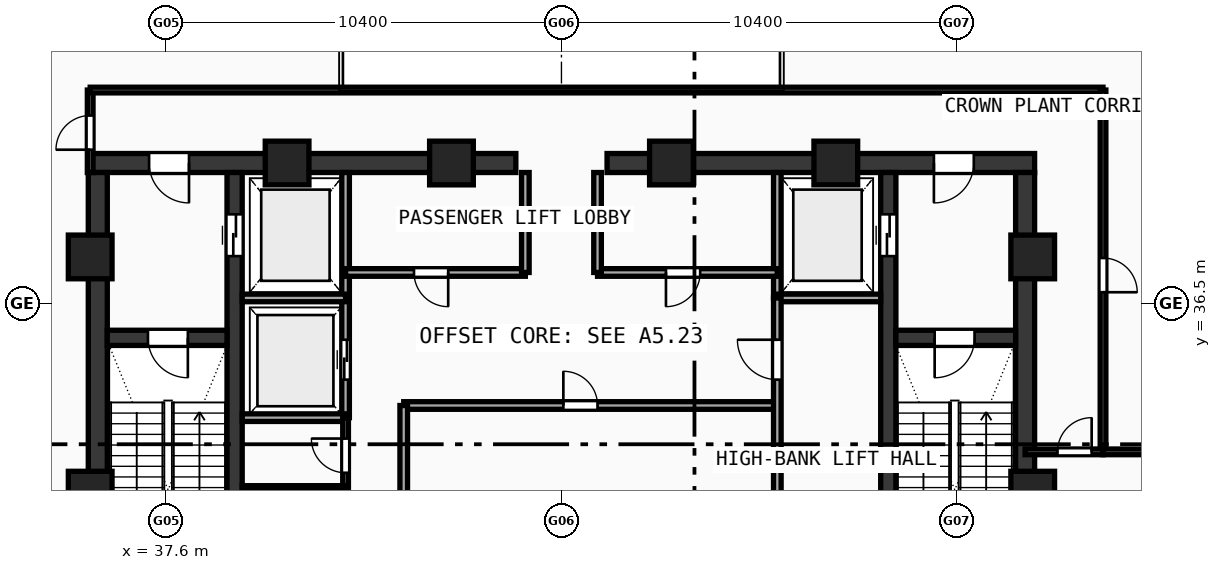
"""IFC4 building model, lengths in metres.
Left out: names, types, materials, properties, quantities, classifications, styles, units other than length and angle.
Written with IfcOpenShell. Run it as: python <this file> out.ifc"""

import sys

from ifc_helpers import new_model, si_unit, direction, frame, frame_2d, origin, origin_with_axes, origin_2d, place, context, subcontext, project, spatial, rectangle, hollow_rectangle, extrude, source, transform, mapped, element, fill, save


model = new_model("IFC4")
c1 = context("Model", 3, precision=1e-05, world=origin(), true_north=direction((0.0, 1.0)))
c2 = subcontext(c1, "Body", "Model", "MODEL_VIEW")
j1 = project(units=[si_unit("LENGTHUNIT", "METRE"), si_unit("PLANEANGLEUNIT", "RADIAN")], contexts=[c1])
p1 = place(None, origin())
s1 = spatial("IfcSite", under=j1, at=p1, CompositionType="ELEMENT")
p2 = place(p1, origin())
s2 = spatial("IfcBuilding", under=s1, at=p2, CompositionType="ELEMENT")
p3 = place(p2, frame((0.0, 0.0, 376.76)))
s3 = spatial("IfcBuildingStorey", under=s2, at=p3, CompositionType="ELEMENT", Elevation=376.76)
p4 = place(p3, frame((35.55, 40.2, 0.0), z_axis=(0.0, 0.0, 1.0), x_axis=(1.0, 0.0, 0.0)))
e1 = element("IfcWall", 1, at=p4, inside=s3, PredefinedType="SHEAR", context=c2, shape_type="SweptSolid", body=[
    extrude(rectangle(XDim=11.25, YDim=0.5, at=frame_2d((5.625, 0.0))), origin(), (0.0, 0.0, 1.0), 4.72),
])
p5 = place(p4, frame((1.6, 0.0, 0.0)))
e2 = element("IfcOpeningElement", 2, at=p5, cuts=e1, PredefinedType="OPENING", context=c2, shape_type="SweptSolid", body=[
    extrude(rectangle(XDim=1.05, YDim=2.1, at=frame_2d((0.525, 1.05))), frame((0.0, 0.26, 0.0), z_axis=(0.0, -1.0, 0.0), x_axis=(1.0, 0.0, 0.0)), (0.0, 0.0, 1.0), 0.52),
])
p6 = place(p3, frame((49.2, 40.2, 0.0), z_axis=(0.0, 0.0, 1.0), x_axis=(1.0, 0.0, 0.0)))
e3 = element("IfcWall", 3, at=p6, inside=s3, PredefinedType="SHEAR", context=c2, shape_type="SweptSolid", body=[
    extrude(rectangle(XDim=11.25, YDim=0.5, at=frame_2d((5.625, 0.0))), origin(), (0.0, 0.0, 1.0), 4.72),
])
p7 = place(p6, frame((8.6, 0.0, 0.0)))
e4 = element("IfcOpeningElement", 4, at=p7, cuts=e3, PredefinedType="OPENING", context=c2, shape_type="SweptSolid", body=[
    extrude(rectangle(XDim=1.05, YDim=2.1, at=frame_2d((0.525, 1.05))), frame((0.0, 0.26, 0.0), z_axis=(0.0, -1.0, 0.0), x_axis=(1.0, 0.0, 0.0)), (0.0, 0.0, 1.0), 0.52),
])
for number, where, z_axis, x_axis in (
    (5, (35.8, 27.75, 0.0), (0.0, 0.0, 1.0), (0.0, 1.0, 0.0)),
    (6, (60.2, 27.75, 0.0), (0.0, 0.0, 1.0), (0.0, 1.0, 0.0)),
):
    element("IfcWall", number, at=place(p3, frame(where, z_axis=z_axis, x_axis=x_axis)), inside=s3, PredefinedType="SHEAR", context=c2, shape_type="SweptSolid", body=[
        extrude(rectangle(XDim=12.2, YDim=0.5, at=frame_2d((6.1, 0.0))), origin(), (0.0, 0.0, 1.0), 4.72),
    ])
p8 = place(p3, frame((39.4, 27.75, 0.0), z_axis=(0.0, 0.0, 1.0), x_axis=(0.0, 1.0, 0.0)))
e7 = element("IfcWall", 7, at=p8, inside=s3, PredefinedType="SHEAR", context=c2, shape_type="SweptSolid", body=[
    extrude(rectangle(XDim=12.2, YDim=0.4, at=frame_2d((6.1, 0.0))), origin(), (0.0, 0.0, 1.0), 4.72),
])
p9 = place(p8, frame((10.0, 0.0, 0.0)))
e8 = element("IfcOpeningElement", 8, at=p9, cuts=e7, PredefinedType="OPENING", context=c2, shape_type="SweptSolid", body=[
    extrude(rectangle(XDim=1.1, YDim=2.1, at=frame_2d((0.55, 1.05))), frame((0.0, 0.21, 0.0), z_axis=(0.0, -1.0, 0.0), x_axis=(1.0, 0.0, 0.0)), (0.0, 0.0, 1.0), 0.42),
])
p10 = place(p3, frame((56.6, 27.75, 0.0), z_axis=(0.0, 0.0, 1.0), x_axis=(0.0, 1.0, 0.0)))
e9 = element("IfcWall", 9, at=p10, inside=s3, PredefinedType="SHEAR", context=c2, shape_type="SweptSolid", body=[
    extrude(rectangle(XDim=12.2, YDim=0.4, at=frame_2d((6.1, 0.0))), origin(), (0.0, 0.0, 1.0), 4.72),
])
p11 = place(p10, frame((10.0, 0.0, 0.0)))
e10 = element("IfcOpeningElement", 10, at=p11, cuts=e9, PredefinedType="OPENING", context=c2, shape_type="SweptSolid", body=[
    extrude(rectangle(XDim=1.1, YDim=2.1, at=frame_2d((0.55, 1.05))), frame((0.0, 0.21, 0.0), z_axis=(0.0, -1.0, 0.0), x_axis=(1.0, 0.0, 0.0)), (0.0, 0.0, 1.0), 0.42),
])
p12 = place(p3, frame((36.05, 35.6, 0.0), z_axis=(0.0, 0.0, 1.0), x_axis=(1.0, 0.0, 0.0)))
e11 = element("IfcWall", 11, at=p12, inside=s3, PredefinedType="SHEAR", context=c2, shape_type="SweptSolid", body=[
    extrude(rectangle(XDim=3.15, YDim=0.4, at=frame_2d((1.575, 0.0))), origin(), (0.0, 0.0, 1.0), 4.72),
])
p13 = place(p12, frame((1.07, 0.0, 0.0)))
e12 = element("IfcOpeningElement", 12, at=p13, cuts=e11, PredefinedType="OPENING", context=c2, shape_type="SweptSolid", body=[
    extrude(rectangle(XDim=1.05, YDim=2.1, at=frame_2d((0.525, 1.05))), frame((0.0, 0.21, 0.0), z_axis=(0.0, -1.0, 0.0), x_axis=(1.0, 0.0, 0.0)), (0.0, 0.0, 1.0), 0.42),
])
p14 = place(p3, frame((56.8, 35.6, 0.0), z_axis=(0.0, 0.0, 1.0), x_axis=(1.0, 0.0, 0.0)))
e13 = element("IfcWall", 13, at=p14, inside=s3, PredefinedType="SHEAR", context=c2, shape_type="SweptSolid", body=[
    extrude(rectangle(XDim=3.15, YDim=0.4, at=frame_2d((1.575, 0.0))), origin(), (0.0, 0.0, 1.0), 4.72),
])
p15 = place(p14, frame((1.02, 0.0, 0.0)))
e14 = element("IfcOpeningElement", 14, at=p15, cuts=e13, PredefinedType="OPENING", context=c2, shape_type="SweptSolid", body=[
    extrude(rectangle(XDim=1.05, YDim=2.1, at=frame_2d((0.525, 1.05))), frame((0.0, 0.21, 0.0), z_axis=(0.0, -1.0, 0.0), x_axis=(1.0, 0.0, 0.0)), (0.0, 0.0, 1.0), 0.42),
])
m1 = source(origin(), c2, "Body", "SweptSolid", [
    extrude(hollow_rectangle(XDim=1.15, YDim=1.15, WallThickness=0.048, at=origin_2d()), origin(), (0.0, 0.0, 1.0), 5.0),
])
for number, where, z_axis, x_axis in (
    (15, (60.4, 31.513, -0.28), (0.0, 0.0, 1.0), (1.0, 0.0, 0.0)),
    (16, (60.4, 37.729, -0.28), (0.0, 0.0, 1.0), (1.0, 0.0, 0.0)),
    (17, (55.219, 40.2, -0.28), (0.0, 0.0, 1.0), (1.0, 0.0, 0.0)),
    (18, (50.894, 40.2, -0.28), (0.0, 0.0, 1.0), (1.0, 0.0, 0.0)),
    (19, (45.106, 40.2, -0.28), (0.0, 0.0, 1.0), (1.0, 0.0, 0.0)),
    (20, (40.781, 40.2, -0.28), (0.0, 0.0, 1.0), (1.0, 0.0, 0.0)),
    (21, (35.6, 37.729, -0.28), (0.0, 0.0, 1.0), (1.0, 0.0, 0.0)),
    (22, (35.6, 31.513, -0.28), (0.0, 0.0, 1.0), (1.0, 0.0, 0.0)),
):
    element("IfcColumn", number, at=place(p3, frame(where, z_axis=z_axis, x_axis=x_axis)), inside=s3, PredefinedType="COLUMN", context=c2, shape_type="MappedRepresentation", body=[
        mapped(m1, transform((0.0, 0.0, 0.0), scale=1.0)),
    ])
p16 = place(p3, frame((42.32, 33.5, 0.0), z_axis=(0.0, 0.0, 1.0), x_axis=(0.0, 1.0, 0.0)))
e23 = element("IfcWall", 23, at=p16, inside=s3, PredefinedType="SOLIDWALL", context=c2, shape_type="SweptSolid", body=[
    extrude(rectangle(XDim=6.45, YDim=0.2, at=frame_2d((3.225, 0.0))), origin(), (0.0, 0.0, 1.0), 4.72),
])
p17 = place(p16, frame((1.0, 0.0, 0.0)))
e24 = element("IfcOpeningElement", 24, at=p17, cuts=e23, PredefinedType="OPENING", context=c2, shape_type="SweptSolid", body=[
    extrude(rectangle(XDim=1.05, YDim=2.1, at=frame_2d((0.525, 1.05))), frame((0.0, 0.11, 0.0), z_axis=(0.0, -1.0, 0.0), x_axis=(1.0, 0.0, 0.0)), (0.0, 0.0, 1.0), 0.22),
])
for number, where, z_axis, x_axis in (
    (25, (39.6, 36.65, 0.0), (0.0, 0.0, 1.0), (1.0, 0.0, 0.0)),
    (26, (39.6, 33.5, 0.0), (0.0, 0.0, 1.0), (1.0, 0.0, 0.0)),
):
    element("IfcWall", number, at=place(p3, frame(where, z_axis=z_axis, x_axis=x_axis)), inside=s3, PredefinedType="SOLIDWALL", context=c2, shape_type="SweptSolid", body=[
        extrude(rectangle(XDim=2.72, YDim=0.2, at=frame_2d((1.36, 0.0))), origin(), (0.0, 0.0, 1.0), 4.72),
    ])
p18 = place(p3, frame((53.68, 36.65, 0.0), z_axis=(0.0, 0.0, 1.0), x_axis=(0.0, 1.0, 0.0)))
e27 = element("IfcWall", 27, at=p18, inside=s3, PredefinedType="SOLIDWALL", context=c2, shape_type="SweptSolid", body=[
    extrude(rectangle(XDim=3.3, YDim=0.2, at=frame_2d((1.65, 0.0))), origin(), (0.0, 0.0, 1.0), 4.72),
])
p19 = place(p3, frame((53.68, 36.65, 0.0), z_axis=(0.0, 0.0, 1.0), x_axis=(1.0, 0.0, 0.0)))
e28 = element("IfcWall", 28, at=p19, inside=s3, PredefinedType="SOLIDWALL", context=c2, shape_type="SweptSolid", body=[
    extrude(rectangle(XDim=2.72, YDim=0.2, at=frame_2d((1.36, 0.0))), origin(), (0.0, 0.0, 1.0), 4.72),
])
p20 = place(p3, frame((42.32, 37.32, 0.0), z_axis=(0.0, 0.0, 1.0), x_axis=(1.0, 0.0, 0.0)))
e29 = element("IfcWall", 29, at=p20, inside=s3, PredefinedType="SOLIDWALL", context=c2, shape_type="SweptSolid", body=[
    extrude(rectangle(XDim=4.73, YDim=0.2, at=frame_2d((2.365, 0.0))), origin(), (0.0, 0.0, 1.0), 4.72),
])
p21 = place(p20, frame((1.8, 0.0, 0.0)))
e30 = element("IfcOpeningElement", 30, at=p21, cuts=e29, PredefinedType="OPENING", context=c2, shape_type="SweptSolid", body=[
    extrude(rectangle(XDim=0.9, YDim=2.1, at=frame_2d((0.45, 1.05))), frame((0.0, 0.11, 0.0), z_axis=(0.0, -1.0, 0.0), x_axis=(1.0, 0.0, 0.0)), (0.0, 0.0, 1.0), 0.22),
])
p22 = place(p3, frame((48.95, 37.32, 0.0), z_axis=(0.0, 0.0, 1.0), x_axis=(1.0, 0.0, 0.0)))
e31 = element("IfcWall", 31, at=p22, inside=s3, PredefinedType="SOLIDWALL", context=c2, shape_type="SweptSolid", body=[
    extrude(rectangle(XDim=4.73, YDim=0.2, at=frame_2d((2.365, 0.0))), origin(), (0.0, 0.0, 1.0), 4.72),
])
p23 = place(p22, frame((1.8, 0.0, 0.0)))
e32 = element("IfcOpeningElement", 32, at=p23, cuts=e31, PredefinedType="OPENING", context=c2, shape_type="SweptSolid", body=[
    extrude(rectangle(XDim=0.9, YDim=2.1, at=frame_2d((0.45, 1.05))), frame((0.0, 0.11, 0.0), z_axis=(0.0, -1.0, 0.0), x_axis=(1.0, 0.0, 0.0)), (0.0, 0.0, 1.0), 0.22),
])
for number, where, z_axis, x_axis in (
    (33, (47.05, 37.32, 0.0), (0.0, 0.0, 1.0), (0.0, 1.0, 0.0)),
    (34, (48.95, 37.32, 0.0), (0.0, 0.0, 1.0), (0.0, 1.0, 0.0)),
):
    element("IfcWall", number, at=place(p3, frame(where, z_axis=z_axis, x_axis=x_axis)), inside=s3, PredefinedType="SOLIDWALL", context=c2, shape_type="SweptSolid", body=[
        extrude(rectangle(XDim=2.63, YDim=0.2, at=frame_2d((1.315, 0.0))), origin(), (0.0, 0.0, 1.0), 4.72),
    ])
p24 = place(p3, frame((43.85, 33.82, 0.0), z_axis=(0.0, 0.0, 1.0), x_axis=(1.0, 0.0, 0.0)))
e35 = element("IfcWall", 35, at=p24, inside=s3, PredefinedType="SOLIDWALL", context=c2, shape_type="SweptSolid", body=[
    extrude(rectangle(XDim=9.83, YDim=0.2, at=frame_2d((4.915, 0.0))), origin(), (0.0, 0.0, 1.0), 4.72),
])
p25 = place(p24, frame((4.2, 0.0, 0.0)))
e36 = element("IfcOpeningElement", 36, at=p25, cuts=e35, PredefinedType="OPENING", context=c2, shape_type="SweptSolid", body=[
    extrude(rectangle(XDim=0.9, YDim=2.1, at=frame_2d((0.45, 1.05))), frame((0.0, 0.11, 0.0), z_axis=(0.0, -1.0, 0.0), x_axis=(1.0, 0.0, 0.0)), (0.0, 0.0, 1.0), 0.22),
])
p26 = place(p3, frame((43.85, 27.6, 0.0), z_axis=(0.0, 0.0, 1.0), x_axis=(0.0, 1.0, 0.0)))
e37 = element("IfcWall", 37, at=p26, inside=s3, PredefinedType="SOLIDWALL", context=c2, shape_type="SweptSolid", body=[
    extrude(rectangle(XDim=6.22, YDim=0.2, at=frame_2d((3.11, 0.0))), origin(), (0.0, 0.0, 1.0), 4.72),
])
p27 = place(p26, frame((2.25, 0.0, 0.0)))
e38 = element("IfcOpeningElement", 38, at=p27, cuts=e37, PredefinedType="OPENING", context=c2, shape_type="SweptSolid", body=[
    extrude(rectangle(XDim=1.05, YDim=2.1, at=frame_2d((0.525, 1.05))), frame((0.0, 0.11, 0.0), z_axis=(0.0, -1.0, 0.0), x_axis=(1.0, 0.0, 0.0)), (0.0, 0.0, 1.0), 0.22),
])
p28 = place(p3, frame((53.68, 27.6, 0.0), z_axis=(0.0, 0.0, 1.0), x_axis=(0.0, 1.0, 0.0)))
e39 = element("IfcWall", 39, at=p28, inside=s3, PredefinedType="SOLIDWALL", context=c2, shape_type="SweptSolid", body=[
    extrude(rectangle(XDim=9.05, YDim=0.2, at=frame_2d((4.525, 0.0))), origin(), (0.0, 0.0, 1.0), 4.72),
])
p29 = place(p28, frame((6.9, 0.0, 0.0)))
e40 = element("IfcOpeningElement", 40, at=p29, cuts=e39, PredefinedType="OPENING", context=c2, shape_type="SweptSolid", body=[
    extrude(rectangle(XDim=1.05, YDim=2.1, at=frame_2d((0.525, 1.05))), frame((0.0, 0.11, 0.0), z_axis=(0.0, -1.0, 0.0), x_axis=(1.0, 0.0, 0.0)), (0.0, 0.0, 1.0), 0.22),
])
p30 = place(p3, frame((42.32, 27.6, 0.0), z_axis=(0.0, 0.0, 1.0), x_axis=(0.0, 1.0, 0.0)))
e41 = element("IfcWall", 41, at=p30, inside=s3, PredefinedType="PARTITIONING", context=c2, shape_type="SweptSolid", body=[
    extrude(rectangle(XDim=5.9, YDim=0.15, at=frame_2d((2.95, 0.0))), origin(), (0.0, 0.0, 1.0), 4.72),
])
p31 = place(p30, frame((1.4, 0.0, 0.0)))
e42 = element("IfcOpeningElement", 42, at=p31, cuts=e41, PredefinedType="OPENING", context=c2, shape_type="SweptSolid", body=[
    extrude(rectangle(XDim=0.9, YDim=2.1, at=frame_2d((0.45, 1.05))), frame((0.0, 0.085, 0.0), z_axis=(0.0, -1.0, 0.0), x_axis=(1.0, 0.0, 0.0)), (0.0, 0.0, 1.0), 0.17),
])
p32 = place(p30, frame((4.45, 0.0, 0.0)))
e43 = element("IfcOpeningElement", 43, at=p32, cuts=e41, PredefinedType="OPENING", context=c2, shape_type="SweptSolid", body=[
    extrude(rectangle(XDim=0.9, YDim=2.1, at=frame_2d((0.45, 1.05))), frame((0.0, 0.085, 0.0), z_axis=(0.0, -1.0, 0.0), x_axis=(1.0, 0.0, 0.0)), (0.0, 0.0, 1.0), 0.17),
])
p33 = place(p3, frame((39.6, 31.65, 0.0), z_axis=(0.0, 0.0, 1.0), x_axis=(1.0, 0.0, 0.0)))
e44 = element("IfcWall", 44, at=p33, inside=s3, PredefinedType="PARTITIONING", context=c2, shape_type="SweptSolid", body=[
    extrude(rectangle(XDim=2.72, YDim=0.12, at=frame_2d((1.36, 0.0))), origin(), (0.0, 0.0, 1.0), 4.72),
])
p34 = place(p3, frame((35.6, 39.95, 0.0), z_axis=(0.0, 0.0, 1.0), x_axis=(0.0, 1.0, 0.0)))
e45 = element("IfcWall", 45, at=p34, inside=s3, PredefinedType="PARTITIONING", context=c2, shape_type="SweptSolid", body=[
    extrude(rectangle(XDim=2.17, YDim=0.15, at=frame_2d((1.085, 0.0))), origin(), (0.0, 0.0, 1.0), 4.37),
])
p35 = place(p34, frame((0.6, 0.0, 0.0)))
e46 = element("IfcOpeningElement", 46, at=p35, cuts=e45, PredefinedType="OPENING", context=c2, shape_type="SweptSolid", body=[
    extrude(rectangle(XDim=0.9, YDim=2.1, at=frame_2d((0.45, 1.05))), frame((0.0, 0.085, 0.0), z_axis=(0.0, -1.0, 0.0), x_axis=(1.0, 0.0, 0.0)), (0.0, 0.0, 1.0), 0.17),
])
p36 = place(p3, frame((35.6, 42.12, 0.0), z_axis=(0.0, 0.0, 1.0), x_axis=(1.0, 0.0, 0.0)))
e47 = element("IfcWall", 47, at=p36, inside=s3, PredefinedType="PARTITIONING", context=c2, shape_type="SweptSolid", body=[
    extrude(rectangle(XDim=26.65, YDim=0.15, at=frame_2d((13.325, 0.0))), origin(), (0.0, 0.0, 1.0), 4.12),
])
p37 = place(p3, frame((62.25, 32.6, 0.0), z_axis=(0.0, 0.0, 1.0), x_axis=(0.0, 1.0, 0.0)))
e48 = element("IfcWall", 48, at=p37, inside=s3, PredefinedType="PARTITIONING", context=c2, shape_type="SweptSolid", body=[
    extrude(rectangle(XDim=9.52, YDim=0.15, at=frame_2d((4.76, 0.0))), origin(), (0.0, 0.0, 1.0), 4.12),
])
p38 = place(p37, frame((4.2, 0.0, 0.0)))
e49 = element("IfcOpeningElement", 49, at=p38, cuts=e48, PredefinedType="OPENING", context=c2, shape_type="SweptSolid", body=[
    extrude(rectangle(XDim=0.9, YDim=2.1, at=frame_2d((0.45, 1.05))), frame((0.0, 0.085, 0.0), z_axis=(0.0, -1.0, 0.0), x_axis=(1.0, 0.0, 0.0)), (0.0, 0.0, 1.0), 0.17),
])
p39 = place(p3, frame((60.2, 32.6, 0.0), z_axis=(0.0, 0.0, 1.0), x_axis=(1.0, 0.0, 0.0)))
e50 = element("IfcWall", 50, at=p39, inside=s3, PredefinedType="PARTITIONING", context=c2, shape_type="SweptSolid", body=[
    extrude(rectangle(XDim=2.05, YDim=0.15, at=frame_2d((1.025, 0.0))), origin(), (0.0, 0.0, 1.0), 4.72),
])
p40 = place(p39, frame((0.851, 0.0, 0.0)))
e51 = element("IfcOpeningElement", 51, at=p40, cuts=e50, PredefinedType="OPENING", context=c2, shape_type="SweptSolid", body=[
    extrude(rectangle(XDim=0.9, YDim=2.1, at=frame_2d((0.45, 1.05))), frame((0.0, 0.085, 0.0), z_axis=(0.0, -1.0, 0.0), x_axis=(1.0, 0.0, 0.0)), (0.0, 0.0, 1.0), 0.17),
])
p41 = place(p3, frame((62.25, 32.6, 0.0), z_axis=(0.0, 0.0, 1.0), x_axis=(1.0, 0.0, 0.0)))
e52 = element("IfcWall", 52, at=p41, inside=s3, PredefinedType="PARTITIONING", context=c2, shape_type="SweptSolid", body=[
    extrude(rectangle(XDim=9.97, YDim=0.15, at=frame_2d((4.985, 0.0))), origin(), (0.0, 0.0, 1.0), 4.12),
])
m2 = source(origin(), c2, "Body", "SweptSolid", [
    extrude(rectangle(XDim=1.05, YDim=2.1, at=frame_2d((0.525, 1.05))), frame((0.0, 0.025, 0.0), z_axis=(0.0, -1.0, 0.0), x_axis=(1.0, 0.0, 0.0)), (0.0, 0.0, 1.0), 0.05),
])
p42 = place(p13, frame((1.05, 0.0, 0.0), z_axis=(0.0, 0.0, 1.0), x_axis=(-1.0, 0.0, 0.0)))
e53 = element("IfcDoor", 53, at=p42, inside=s3, OperationType="SINGLE_SWING_LEFT", PredefinedType="DOOR", context=c2, shape_type="MappedRepresentation", body=[
    mapped(m2, transform((0.0, 0.0, 0.0), scale=1.0)),
])
fill(e12, e53)
p43 = place(p15, frame((1.05, 0.0, 0.0), z_axis=(0.0, 0.0, 1.0), x_axis=(-1.0, 0.0, 0.0)))
e54 = element("IfcDoor", 54, at=p43, inside=s3, OperationType="SINGLE_SWING_RIGHT", PredefinedType="DOOR", context=c2, shape_type="MappedRepresentation", body=[
    mapped(m2, transform((0.0, 0.0, 0.0), scale=1.0)),
])
fill(e14, e54)
p44 = place(p5, frame((1.05, 0.0, 0.0), z_axis=(0.0, 0.0, 1.0), x_axis=(-1.0, 0.0, 0.0)))
e55 = element("IfcDoor", 55, at=p44, inside=s3, OperationType="SINGLE_SWING_LEFT", PredefinedType="DOOR", context=c2, shape_type="MappedRepresentation", body=[
    mapped(m2, transform((0.0, 0.0, 0.0), scale=1.0)),
])
fill(e2, e55)
p45 = place(p7, frame((1.05, 0.0, 0.0), z_axis=(0.0, 0.0, 1.0), x_axis=(-1.0, 0.0, 0.0)))
e56 = element("IfcDoor", 56, at=p45, inside=s3, OperationType="SINGLE_SWING_RIGHT", PredefinedType="DOOR", context=c2, shape_type="MappedRepresentation", body=[
    mapped(m2, transform((0.0, 0.0, 0.0), scale=1.0)),
])
fill(e4, e56)
m3 = source(origin(), c2, "Body", "SweptSolid", [
    extrude(rectangle(XDim=1.1, YDim=2.1, at=frame_2d((0.55, 1.05))), frame((0.0, 0.025, 0.0), z_axis=(0.0, -1.0, 0.0), x_axis=(1.0, 0.0, 0.0)), (0.0, 0.0, 1.0), 0.05),
])
p46 = place(p9, frame((1.1, 0.0, 0.0), z_axis=(0.0, 0.0, 1.0), x_axis=(-1.0, 0.0, 0.0)))
e57 = element("IfcDoor", 57, at=p46, inside=s3, OperationType="DOUBLE_DOOR_SLIDING", PredefinedType="DOOR", context=c2, shape_type="MappedRepresentation", body=[
    mapped(m3, transform((0.0, 0.0, 0.0), scale=1.0)),
])
fill(e8, e57)
p47 = place(p11, origin_with_axes())
e58 = element("IfcDoor", 58, at=p47, inside=s3, OperationType="DOUBLE_DOOR_SLIDING", PredefinedType="DOOR", context=c2, shape_type="MappedRepresentation", body=[
    mapped(m3, transform((0.0, 0.0, 0.0), scale=1.0)),
])
fill(e10, e58)
p48 = place(p17, origin_with_axes())
e59 = element("IfcDoor", 59, at=p48, inside=s3, OperationType="DOUBLE_DOOR_SLIDING", PredefinedType="DOOR", context=c2, shape_type="MappedRepresentation", body=[
    mapped(m2, transform((0.0, 0.0, 0.0), scale=1.0)),
])
fill(e24, e59)
m4 = source(origin(), c2, "Body", "SweptSolid", [
    extrude(rectangle(XDim=0.9, YDim=2.1, at=frame_2d((0.45, 1.05))), frame((0.0, 0.025, 0.0), z_axis=(0.0, -1.0, 0.0), x_axis=(1.0, 0.0, 0.0)), (0.0, 0.0, 1.0), 0.05),
])
p49 = place(p21, frame((0.9, 0.0, 0.0), z_axis=(0.0, 0.0, 1.0), x_axis=(-1.0, 0.0, 0.0)))
e60 = element("IfcDoor", 60, at=p49, inside=s3, OperationType="SINGLE_SWING_LEFT", PredefinedType="DOOR", context=c2, shape_type="MappedRepresentation", body=[
    mapped(m4, transform((0.0, 0.0, 0.0), scale=1.0)),
])
fill(e30, e60)
p50 = place(p23, frame((0.9, 0.0, 0.0), z_axis=(0.0, 0.0, 1.0), x_axis=(-1.0, 0.0, 0.0)))
e61 = element("IfcDoor", 61, at=p50, inside=s3, OperationType="SINGLE_SWING_RIGHT", PredefinedType="DOOR", context=c2, shape_type="MappedRepresentation", body=[
    mapped(m4, transform((0.0, 0.0, 0.0), scale=1.0)),
])
fill(e32, e61)
p51 = place(p25, origin_with_axes())
e62 = element("IfcDoor", 62, at=p51, inside=s3, OperationType="SINGLE_SWING_LEFT", PredefinedType="DOOR", context=c2, shape_type="MappedRepresentation", body=[
    mapped(m4, transform((0.0, 0.0, 0.0), scale=1.0)),
])
fill(e36, e62)
p52 = place(p29, origin_with_axes())
e63 = element("IfcDoor", 63, at=p52, inside=s3, OperationType="SINGLE_SWING_RIGHT", PredefinedType="DOOR", context=c2, shape_type="MappedRepresentation", body=[
    mapped(m2, transform((0.0, 0.0, 0.0), scale=1.0)),
])
fill(e40, e63)
p53 = place(p32, origin_with_axes())
e64 = element("IfcDoor", 64, at=p53, inside=s3, OperationType="SINGLE_SWING_RIGHT", PredefinedType="DOOR", context=c2, shape_type="MappedRepresentation", body=[
    mapped(m4, transform((0.0, 0.0, 0.0), scale=1.0)),
])
fill(e43, e64)
p54 = place(p35, origin_with_axes())
e65 = element("IfcDoor", 65, at=p54, inside=s3, OperationType="SINGLE_SWING_LEFT", PredefinedType="DOOR", context=c2, shape_type="MappedRepresentation", body=[
    mapped(m4, transform((0.0, 0.0, 0.0), scale=1.0)),
])
fill(e46, e65)
p55 = place(p38, frame((0.9, 0.0, 0.0), z_axis=(0.0, 0.0, 1.0), x_axis=(-1.0, 0.0, 0.0)))
e66 = element("IfcDoor", 66, at=p55, inside=s3, OperationType="SINGLE_SWING_RIGHT", PredefinedType="DOOR", context=c2, shape_type="MappedRepresentation", body=[
    mapped(m4, transform((0.0, 0.0, 0.0), scale=1.0)),
])
fill(e49, e66)
p56 = place(p40, origin_with_axes())
e67 = element("IfcDoor", 67, at=p56, inside=s3, OperationType="SINGLE_SWING_RIGHT", PredefinedType="DOOR", context=c2, shape_type="MappedRepresentation", body=[
    mapped(m4, transform((0.0, 0.0, 0.0), scale=1.0)),
])
fill(e51, e67)
save(model, sys.argv[1])
